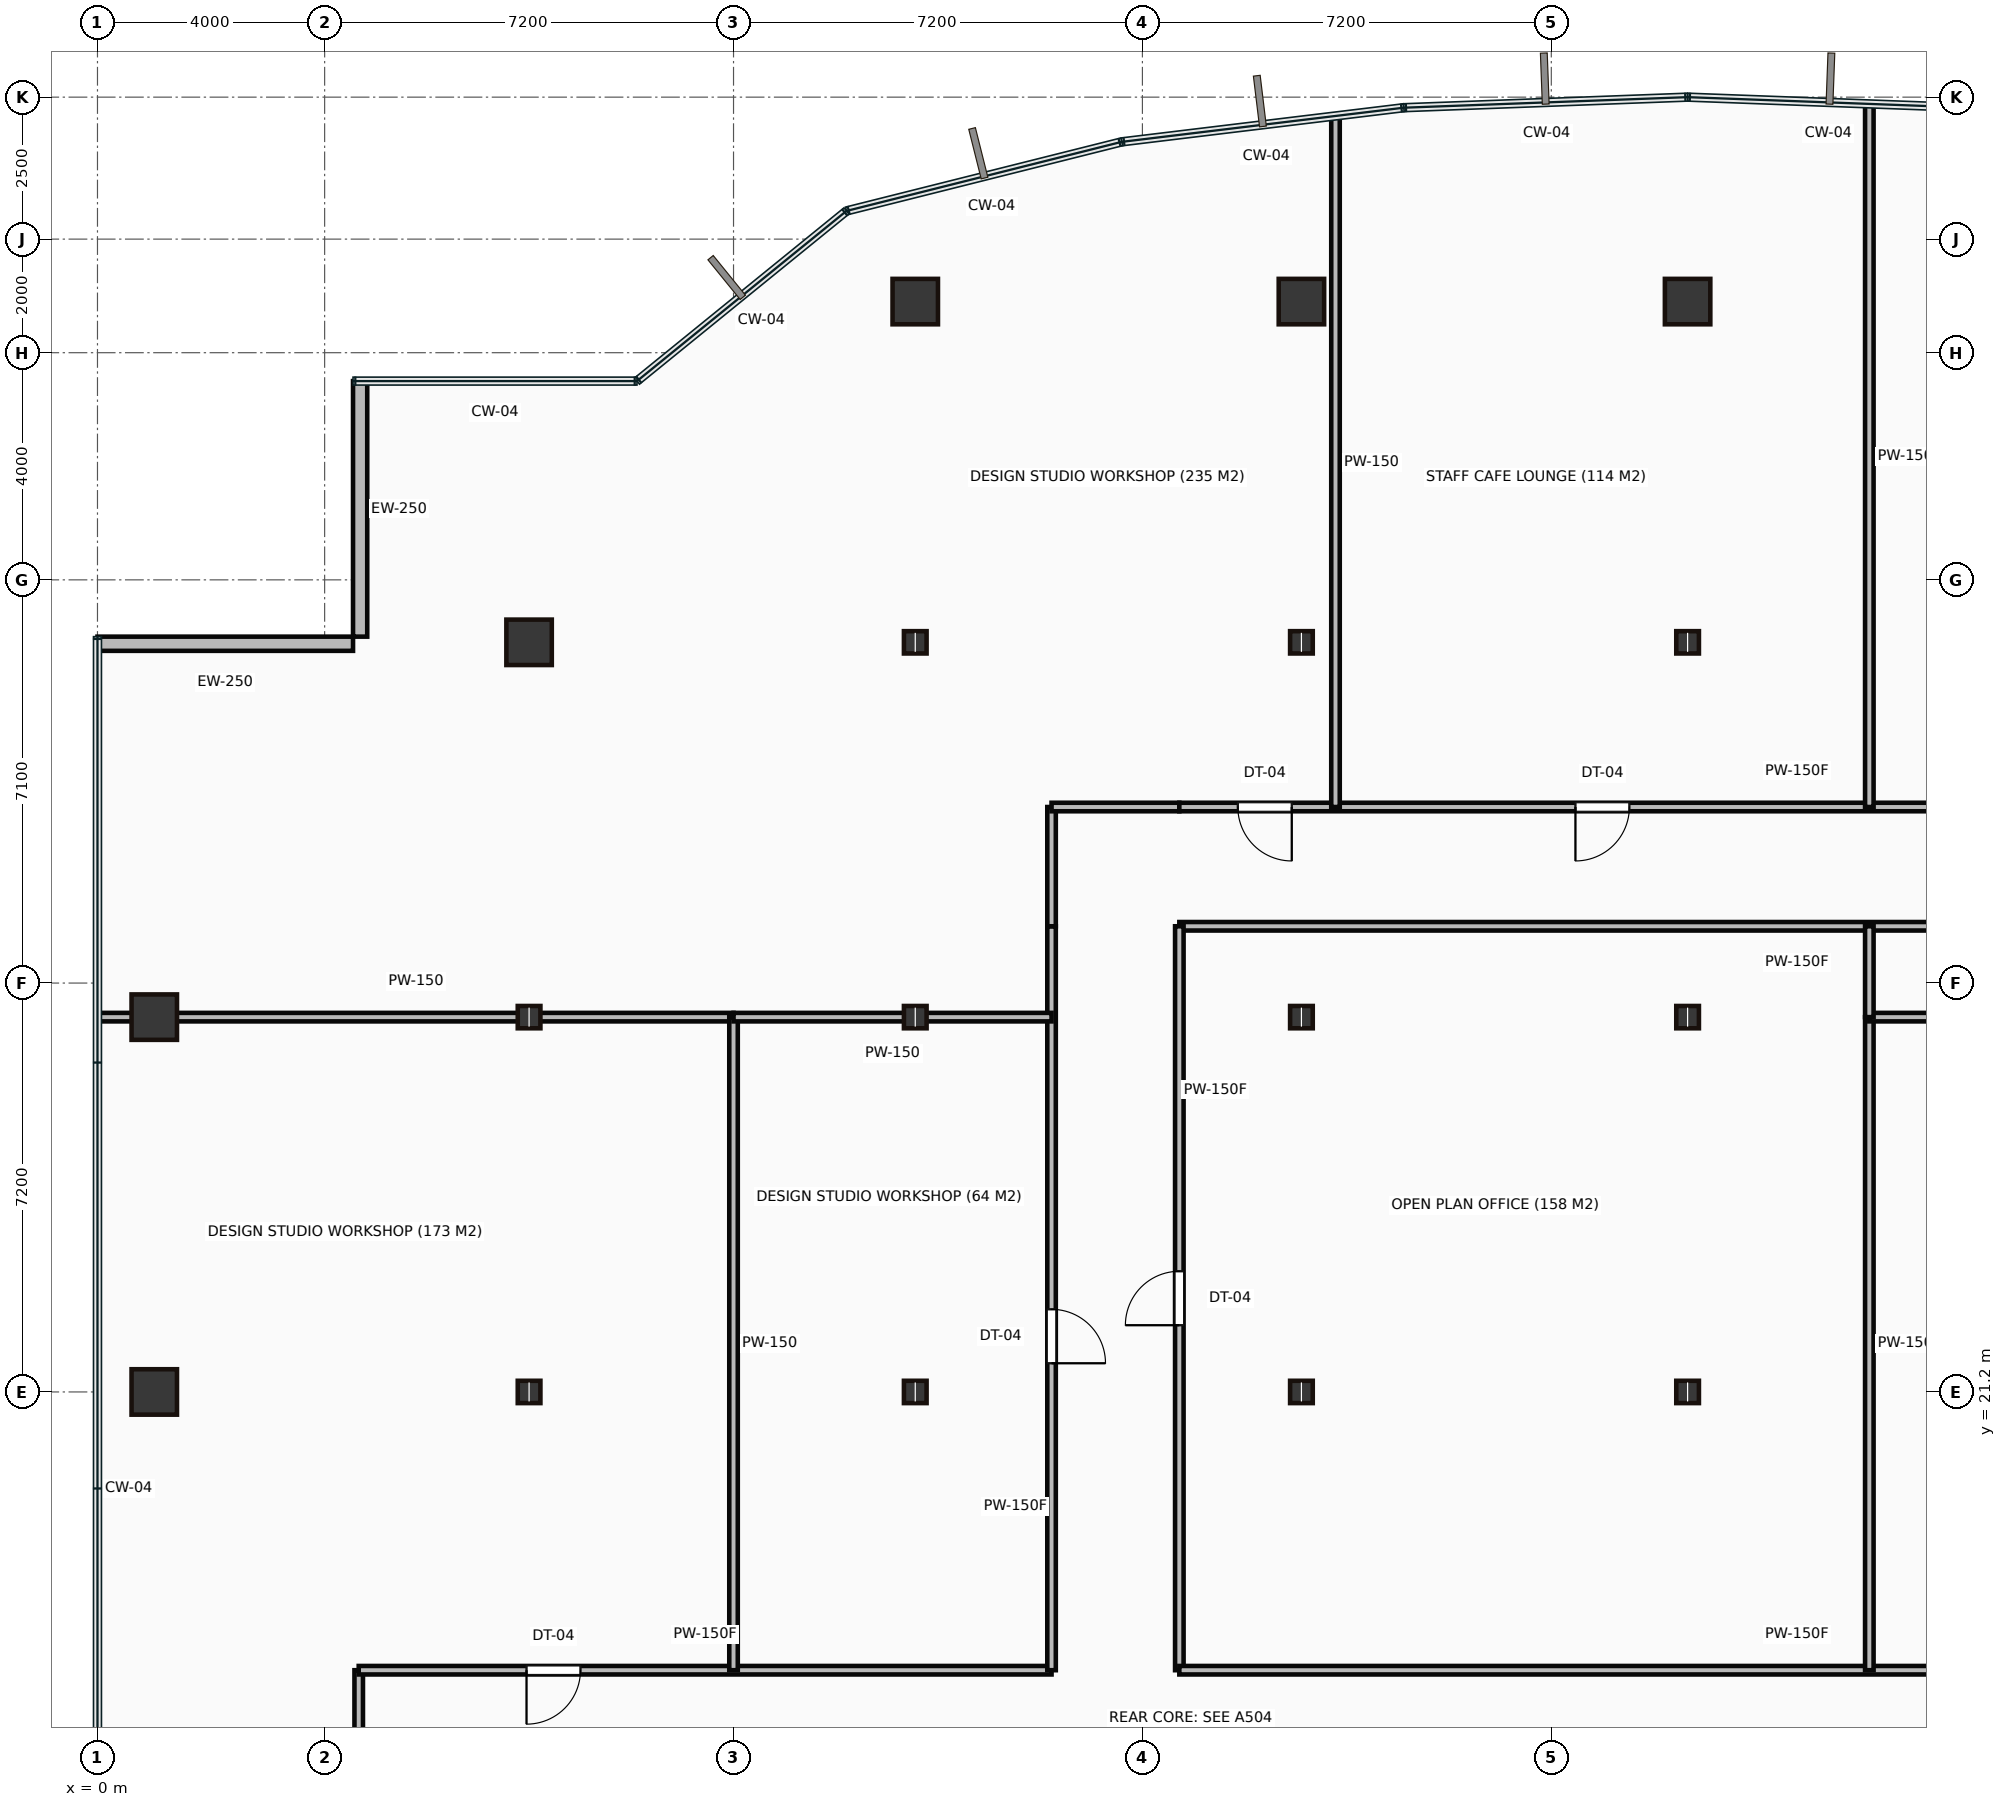
"""IFC4 building model, lengths in metres.
Left out: names, types, materials, properties, quantities, classifications, styles, units other than length and angle.
Written with IfcOpenShell. Run it as: python <this file> out.ifc"""

import sys

from ifc_helpers import new_model, si_unit, direction, frame, frame_2d, origin, origin_2d, place, context, subcontext, project, spatial, rectangle, hollow_rectangle, i_section, extrude, source, transform, mapped, element, fill, save


model = new_model("IFC4")
c1 = context("Model", 3, precision=1e-05, world=origin(), true_north=direction((0.0, 1.0)))
c2 = subcontext(c1, "Body", "Model", "MODEL_VIEW")
j1 = project(units=[si_unit("LENGTHUNIT", "METRE"), si_unit("PLANEANGLEUNIT", "RADIAN")], contexts=[c1])
p1 = place(None, origin())
s1 = spatial("IfcSite", under=j1, at=p1, CompositionType="ELEMENT")
p2 = place(p1, origin())
s2 = spatial("IfcBuilding", under=s1, at=p2, CompositionType="ELEMENT")
p3 = place(p2, frame((0.0, 0.0, 92.3)))
s3 = spatial("IfcBuildingStorey", under=s2, at=p3, CompositionType="ELEMENT", Elevation=92.3)
m1 = source(origin(), c2, "Body", "SweptSolid", [
    extrude(hollow_rectangle(XDim=0.8, YDim=0.8, WallThickness=0.04, at=origin_2d()), origin(), (0.0, 0.0, 1.0), 3.65),
])
for number, where, z_axis, x_axis in (
    (1, (1.0, 21.2, 0.0), (0.0, 0.0, 1.0), (1.0, 0.0, 0.0)),
    (2, (1.0, 27.8, 0.0), (0.0, 0.0, 1.0), (1.0, 0.0, 0.0)),
):
    element("IfcColumn", number, at=place(p3, frame(where, z_axis=z_axis, x_axis=x_axis)), inside=s3, PredefinedType="COLUMN", context=c2, shape_type="MappedRepresentation", body=[
        mapped(m1, transform((0.0, 0.0, 0.0))),
    ])
m2 = source(origin(), c2, "Body", "SweptSolid", [
    extrude(i_section(OverallWidth=0.399, OverallDepth=0.393, WebThickness=0.023, FlangeThickness=0.037, at=origin_2d()), origin(), (0.0, 0.0, 1.0), 3.65),
])
for number, where, z_axis, x_axis in (
    (3, (7.6, 21.2, 0.0), (0.0, 0.0, 1.0), (1.0, 0.0, 0.0)),
    (4, (7.6, 27.8, 0.0), (0.0, 0.0, 1.0), (1.0, 0.0, 0.0)),
):
    element("IfcColumn", number, at=place(p3, frame(where, z_axis=z_axis, x_axis=x_axis)), inside=s3, PredefinedType="COLUMN", context=c2, shape_type="MappedRepresentation", body=[
        mapped(m2, transform((0.0, 0.0, 0.0))),
    ])
p4 = place(p3, frame((7.6, 34.4, 0.0), z_axis=(0.0, 0.0, 1.0), x_axis=(1.0, 0.0, 0.0)))
e5 = element("IfcColumn", 5, at=p4, inside=s3, PredefinedType="COLUMN", context=c2, shape_type="MappedRepresentation", body=[
    mapped(m1, transform((0.0, 0.0, 0.0))),
])
for number, where, z_axis, x_axis in (
    (6, (14.4, 21.2, 0.0), (0.0, 0.0, 1.0), (1.0, 0.0, 0.0)),
    (7, (14.4, 27.8, 0.0), (0.0, 0.0, 1.0), (1.0, 0.0, 0.0)),
    (8, (14.4, 34.4, 0.0), (0.0, 0.0, 1.0), (1.0, 0.0, 0.0)),
):
    element("IfcColumn", number, at=place(p3, frame(where, z_axis=z_axis, x_axis=x_axis)), inside=s3, PredefinedType="COLUMN", context=c2, shape_type="MappedRepresentation", body=[
        mapped(m2, transform((0.0, 0.0, 0.0))),
    ])
p5 = place(p3, frame((14.4, 40.4, 0.0), z_axis=(0.0, 0.0, 1.0), x_axis=(1.0, 0.0, 0.0)))
e9 = element("IfcColumn", 9, at=p5, inside=s3, PredefinedType="COLUMN", context=c2, shape_type="MappedRepresentation", body=[
    mapped(m1, transform((0.0, 0.0, 0.0))),
])
for number, where, z_axis, x_axis in (
    (10, (21.2, 21.2, 0.0), (0.0, 0.0, 1.0), (1.0, 0.0, 0.0)),
    (11, (21.2, 27.8, 0.0), (0.0, 0.0, 1.0), (1.0, 0.0, 0.0)),
    (12, (21.2, 34.4, 0.0), (0.0, 0.0, 1.0), (1.0, 0.0, 0.0)),
):
    element("IfcColumn", number, at=place(p3, frame(where, z_axis=z_axis, x_axis=x_axis)), inside=s3, PredefinedType="COLUMN", context=c2, shape_type="MappedRepresentation", body=[
        mapped(m2, transform((0.0, 0.0, 0.0))),
    ])
p6 = place(p3, frame((21.2, 40.4, 0.0), z_axis=(0.0, 0.0, 1.0), x_axis=(1.0, 0.0, 0.0)))
e13 = element("IfcColumn", 13, at=p6, inside=s3, PredefinedType="COLUMN", context=c2, shape_type="MappedRepresentation", body=[
    mapped(m1, transform((0.0, 0.0, 0.0))),
])
for number, where, z_axis, x_axis in (
    (14, (28.0, 21.2, 0.0), (0.0, 0.0, 1.0), (1.0, 0.0, 0.0)),
    (15, (28.0, 27.8, 0.0), (0.0, 0.0, 1.0), (1.0, 0.0, 0.0)),
    (16, (28.0, 34.4, 0.0), (0.0, 0.0, 1.0), (1.0, 0.0, 0.0)),
):
    element("IfcColumn", number, at=place(p3, frame(where, z_axis=z_axis, x_axis=x_axis)), inside=s3, PredefinedType="COLUMN", context=c2, shape_type="MappedRepresentation", body=[
        mapped(m2, transform((0.0, 0.0, 0.0))),
    ])
p7 = place(p3, frame((28.0, 40.4, 0.0), z_axis=(0.0, 0.0, 1.0), x_axis=(1.0, 0.0, 0.0)))
e17 = element("IfcColumn", 17, at=p7, inside=s3, PredefinedType="COLUMN", context=c2, shape_type="MappedRepresentation", body=[
    mapped(m1, transform((0.0, 0.0, 0.0))),
])
m3 = source(origin(), c2, "Body", "SweptSolid", [
    extrude(rectangle(XDim=4.5, YDim=0.25, at=frame_2d((2.25, 0.0))), origin(), (0.0, 0.0, 1.0), 3.4),
])
for number, where, z_axis, x_axis in (
    (18, (4.625, 39.0, 0.0), (0.0, 0.0, 1.0), (0.0, -1.0, 0.0)),
    (19, (4.5, 34.375, 0.0), (0.0, 0.0, 1.0), (-1.0, 0.0, 0.0)),
):
    element("IfcWall", number, at=place(p3, frame(where, z_axis=z_axis, x_axis=x_axis)), inside=s3, PredefinedType="STANDARD", context=c2, shape_type="MappedRepresentation", body=[
        mapped(m3, transform((0.0, 0.0, 0.0))),
    ])
m4 = source(origin(), c2, "Body", "SweptSolid", [
    extrude(rectangle(XDim=2.22, YDim=0.15, at=frame_2d((1.11, 0.0))), origin(), (0.0, 0.0, 1.0), 3.4),
])
p8 = place(p3, frame((4.6, 14.08, 0.0), z_axis=(0.0, 0.0, 1.0), x_axis=(0.0, 1.0, 0.0)))
e20 = element("IfcWall", 20, at=p8, inside=s3, PredefinedType="PARTITIONING", context=c2, shape_type="MappedRepresentation", body=[
    mapped(m4, transform((0.0, 0.0, 0.0))),
])
m5 = source(origin(), c2, "Body", "SweptSolid", [
    extrude(rectangle(XDim=12.2, YDim=0.15, at=frame_2d((6.1, 0.0))), origin(), (0.0, 0.0, 1.0), 3.4),
])
p9 = place(p3, frame((4.6, 16.3, 0.0), z_axis=(0.0, 0.0, 1.0), x_axis=(1.0, 0.0, 0.0)))
e21 = element("IfcWall", 21, at=p9, inside=s3, PredefinedType="PARTITIONING", context=c2, shape_type="MappedRepresentation", body=[
    mapped(m5, transform((0.0, 0.0, 0.0))),
])
p10 = place(p9, frame((2.955, 0.0, 0.0)))
e22 = element("IfcOpeningElement", 22, at=p10, cuts=e21, PredefinedType="OPENING", context=c2, shape_type="SweptSolid", body=[
    extrude(rectangle(XDim=0.95, YDim=2.15, at=frame_2d((0.475, 1.075))), frame((0.0, 0.085, 0.0), z_axis=(0.0, -1.0, 0.0), x_axis=(1.0, 0.0, 0.0)), (0.0, 0.0, 1.0), 0.17),
])
m6 = source(origin(), c2, "Body", "SweptSolid", [
    extrude(rectangle(XDim=13.1, YDim=0.15, at=frame_2d((6.55, 0.0))), origin(), (0.0, 0.0, 1.0), 3.4),
])
p11 = place(p3, frame((16.8, 16.3, 0.0), z_axis=(0.0, 0.0, 1.0), x_axis=(0.0, 1.0, 0.0)))
e23 = element("IfcWall", 23, at=p11, inside=s3, PredefinedType="PARTITIONING", context=c2, shape_type="MappedRepresentation", body=[
    mapped(m6, transform((0.0, 0.0, 0.0))),
])
p12 = place(p11, frame((5.405, 0.0, 0.0)))
e24 = element("IfcOpeningElement", 24, at=p12, cuts=e23, PredefinedType="OPENING", context=c2, shape_type="SweptSolid", body=[
    extrude(rectangle(XDim=0.95, YDim=2.15, at=frame_2d((0.475, 1.075))), frame((0.0, 0.085, 0.0), z_axis=(0.0, -1.0, 0.0), x_axis=(1.0, 0.0, 0.0)), (0.0, 0.0, 1.0), 0.17),
])
m7 = source(origin(), c2, "Body", "SweptSolid", [
    extrude(rectangle(XDim=2.1, YDim=0.15, at=frame_2d((1.05, 0.0))), origin(), (0.0, 0.0, 1.0), 3.4),
])
p13 = place(p3, frame((16.8, 29.4, 0.0), z_axis=(0.0, 0.0, 1.0), x_axis=(0.0, 1.0, 0.0)))
e25 = element("IfcWall", 25, at=p13, inside=s3, PredefinedType="PARTITIONING", context=c2, shape_type="MappedRepresentation", body=[
    mapped(m7, transform((0.0, 0.0, 0.0))),
])
m8 = source(origin(), c2, "Body", "SweptSolid", [
    extrude(rectangle(XDim=2.25, YDim=0.15, at=frame_2d((1.125, 0.0))), origin(), (0.0, 0.0, 1.0), 3.4),
])
p14 = place(p3, frame((16.8, 31.5, 0.0), z_axis=(0.0, 0.0, 1.0), x_axis=(1.0, 0.0, 0.0)))
e26 = element("IfcWall", 26, at=p14, inside=s3, PredefinedType="PARTITIONING", context=c2, shape_type="MappedRepresentation", body=[
    mapped(m8, transform((0.0, 0.0, 0.0))),
])
m9 = source(origin(), c2, "Body", "SweptSolid", [
    extrude(rectangle(XDim=21.75, YDim=0.15, at=frame_2d((10.875, 0.0))), origin(), (0.0, 0.0, 1.0), 3.4),
])
p15 = place(p3, frame((19.05, 31.5, 0.0), z_axis=(0.0, 0.0, 1.0), x_axis=(1.0, 0.0, 0.0)))
e27 = element("IfcWall", 27, at=p15, inside=s3, PredefinedType="PARTITIONING", context=c2, shape_type="MappedRepresentation", body=[
    mapped(m9, transform((0.0, 0.0, 0.0))),
])
p16 = place(p15, frame((1.03, 0.0, 0.0)))
e28 = element("IfcOpeningElement", 28, at=p16, cuts=e27, PredefinedType="OPENING", context=c2, shape_type="SweptSolid", body=[
    extrude(rectangle(XDim=0.95, YDim=2.15, at=frame_2d((0.475, 1.075))), frame((0.0, 0.085, 0.0), z_axis=(0.0, -1.0, 0.0), x_axis=(1.0, 0.0, 0.0)), (0.0, 0.0, 1.0), 0.17),
])
p17 = place(p15, frame((6.975, 0.0, 0.0)))
e29 = element("IfcOpeningElement", 29, at=p17, cuts=e27, PredefinedType="OPENING", context=c2, shape_type="SweptSolid", body=[
    extrude(rectangle(XDim=0.95, YDim=2.15, at=frame_2d((0.475, 1.075))), frame((0.0, 0.085, 0.0), z_axis=(0.0, -1.0, 0.0), x_axis=(1.0, 0.0, 0.0)), (0.0, 0.0, 1.0), 0.17),
])
p18 = place(p15, frame((16.345, 0.0, 0.0)))
e30 = element("IfcOpeningElement", 30, at=p18, cuts=e27, PredefinedType="OPENING", context=c2, shape_type="SweptSolid", body=[
    extrude(rectangle(XDim=0.95, YDim=2.15, at=frame_2d((0.475, 1.075))), frame((0.0, 0.085, 0.0), z_axis=(0.0, -1.0, 0.0), x_axis=(1.0, 0.0, 0.0)), (0.0, 0.0, 1.0), 0.17),
])
p19 = place(p3, frame((40.8, 29.4, 0.0), z_axis=(0.0, 0.0, 1.0), x_axis=(-1.0, 0.0, 0.0)))
e31 = element("IfcWall", 31, at=p19, inside=s3, PredefinedType="PARTITIONING", context=c2, shape_type="MappedRepresentation", body=[
    mapped(m9, transform((0.0, 0.0, 0.0))),
])
p20 = place(p3, frame((19.05, 29.4, 0.0), z_axis=(0.0, 0.0, 1.0), x_axis=(0.0, -1.0, 0.0)))
e32 = element("IfcWall", 32, at=p20, inside=s3, PredefinedType="PARTITIONING", context=c2, shape_type="MappedRepresentation", body=[
    mapped(m6, transform((0.0, 0.0, 0.0))),
])
p21 = place(p20, frame((6.075, 0.0, 0.0)))
e33 = element("IfcOpeningElement", 33, at=p21, cuts=e32, PredefinedType="OPENING", context=c2, shape_type="SweptSolid", body=[
    extrude(rectangle(XDim=0.95, YDim=2.15, at=frame_2d((0.475, 1.075))), frame((0.0, 0.085, 0.0), z_axis=(0.0, -1.0, 0.0), x_axis=(1.0, 0.0, 0.0)), (0.0, 0.0, 1.0), 0.17),
])
p22 = place(p3, frame((19.05, 16.3, 0.0), z_axis=(0.0, 0.0, 1.0), x_axis=(1.0, 0.0, 0.0)))
e34 = element("IfcWall", 34, at=p22, inside=s3, PredefinedType="PARTITIONING", context=c2, shape_type="MappedRepresentation", body=[
    mapped(m9, transform((0.0, 0.0, 0.0))),
])
p23 = place(p22, frame((16.345, 0.0, 0.0)))
e35 = element("IfcOpeningElement", 35, at=p23, cuts=e34, PredefinedType="OPENING", context=c2, shape_type="SweptSolid", body=[
    extrude(rectangle(XDim=0.95, YDim=2.15, at=frame_2d((0.475, 1.075))), frame((0.0, 0.085, 0.0), z_axis=(0.0, -1.0, 0.0), x_axis=(1.0, 0.0, 0.0)), (0.0, 0.0, 1.0), 0.17),
])
m10 = source(origin(), c2, "Body", "SweptSolid", [
    extrude(rectangle(XDim=11.18, YDim=0.15, at=frame_2d((5.59, 0.0))), origin(), (0.0, 0.0, 1.0), 2.702),
])
p24 = place(p3, frame((0.02, 27.8, 0.0), z_axis=(0.0, 0.0, 1.0), x_axis=(1.0, 0.0, 0.0)))
e36 = element("IfcWall", 36, at=p24, inside=s3, PredefinedType="PARTITIONING", context=c2, shape_type="MappedRepresentation", body=[
    mapped(m10, transform((0.0, 0.0, 0.0))),
])
m11 = source(origin(), c2, "Body", "SweptSolid", [
    extrude(rectangle(XDim=11.5, YDim=0.15, at=frame_2d((5.75, 0.0))), origin(), (0.0, 0.0, 1.0), 3.4),
])
p25 = place(p3, frame((11.2, 27.8, 0.0), z_axis=(0.0, 0.0, 1.0), x_axis=(0.0, -1.0, 0.0)))
e37 = element("IfcWall", 37, at=p25, inside=s3, PredefinedType="PARTITIONING", context=c2, shape_type="MappedRepresentation", body=[
    mapped(m11, transform((0.0, 0.0, 0.0))),
])
m12 = source(origin(), c2, "Body", "SweptSolid", [
    extrude(rectangle(XDim=5.6, YDim=0.15, at=frame_2d((2.8, 0.0))), origin(), (0.0, 0.0, 1.0), 2.702),
])
p26 = place(p3, frame((16.8, 27.8, 0.0), z_axis=(0.0, 0.0, 1.0), x_axis=(-1.0, 0.0, 0.0)))
e38 = element("IfcWall", 38, at=p26, inside=s3, PredefinedType="PARTITIONING", context=c2, shape_type="MappedRepresentation", body=[
    mapped(m12, transform((0.0, 0.0, 0.0))),
])
m13 = source(origin(), c2, "Body", "SweptSolid", [
    extrude(rectangle(XDim=12.148, YDim=0.15, at=frame_2d((6.074, 0.0))), origin(), (0.0, 0.0, 1.0), 3.4),
])
p27 = place(p3, frame((21.8, 43.648, 0.0), z_axis=(0.0, 0.0, 1.0), x_axis=(0.0, -1.0, 0.0)))
e39 = element("IfcWall", 39, at=p27, inside=s3, PredefinedType="PARTITIONING", context=c2, shape_type="MappedRepresentation", body=[
    mapped(m13, transform((0.0, 0.0, 0.0))),
])
p28 = place(p3, frame((31.2, 27.8, 0.0), z_axis=(0.0, 0.0, 1.0), x_axis=(0.0, -1.0, 0.0)))
e40 = element("IfcWall", 40, at=p28, inside=s3, PredefinedType="PARTITIONING", context=c2, shape_type="MappedRepresentation", body=[
    mapped(m11, transform((0.0, 0.0, 0.0))),
])
m14 = source(origin(), c2, "Body", "SweptSolid", [
    extrude(rectangle(XDim=10.3, YDim=0.15, at=frame_2d((5.15, 0.0))), origin(), (0.0, 0.0, 1.0), 2.702),
])
p29 = place(p3, frame((41.5, 27.8, 0.0), z_axis=(0.0, 0.0, 1.0), x_axis=(-1.0, 0.0, 0.0)))
e41 = element("IfcWall", 41, at=p29, inside=s3, PredefinedType="PARTITIONING", context=c2, shape_type="MappedRepresentation", body=[
    mapped(m14, transform((0.0, 0.0, 0.0))),
])
m15 = source(origin(), c2, "Body", "SweptSolid", [
    extrude(rectangle(XDim=1.6, YDim=0.15, at=frame_2d((0.8, 0.0))), origin(), (0.0, 0.0, 1.0), 3.4),
])
p30 = place(p3, frame((31.2, 29.4, 0.0), z_axis=(0.0, 0.0, 1.0), x_axis=(0.0, -1.0, 0.0)))
e42 = element("IfcWall", 42, at=p30, inside=s3, PredefinedType="PARTITIONING", context=c2, shape_type="MappedRepresentation", body=[
    mapped(m15, transform((0.0, 0.0, 0.0))),
])
m16 = source(origin(), c2, "Body", "SweptSolid", [
    extrude(rectangle(XDim=12.361, YDim=0.15, at=frame_2d((6.18, 0.0))), origin(), (0.0, 0.0, 1.0), 3.4),
])
p31 = place(p3, frame((31.2, 43.861, 0.0), z_axis=(0.0, 0.0, 1.0), x_axis=(0.0, -1.0, 0.0)))
e43 = element("IfcWall", 43, at=p31, inside=s3, PredefinedType="PARTITIONING", context=c2, shape_type="MappedRepresentation", body=[
    mapped(m16, transform((0.0, 0.0, 0.0))),
])
m17 = source(origin(), c2, "Body", "SweptSolid", [
    extrude(rectangle(XDim=0.95, YDim=2.15, at=frame_2d((0.475, 1.075))), frame((0.0, 0.025, 0.0), z_axis=(0.0, -1.0, 0.0), x_axis=(1.0, 0.0, 0.0)), (0.0, 0.0, 1.0), 0.05),
])
p32 = place(p10, origin())
e44 = element("IfcDoor", 44, at=p32, inside=s3, OperationType="SINGLE_SWING_LEFT", PredefinedType="DOOR", context=c2, shape_type="MappedRepresentation", body=[
    mapped(m17, transform((0.0, 0.0, 0.0))),
])
fill(e22, e44)
p33 = place(p16, origin())
e45 = element("IfcDoor", 45, at=p33, inside=s3, OperationType="SINGLE_SWING_RIGHT", PredefinedType="DOOR", context=c2, shape_type="MappedRepresentation", body=[
    mapped(m17, transform((0.0, 0.0, 0.0))),
])
fill(e28, e45)
p34 = place(p12, origin())
e46 = element("IfcDoor", 46, at=p34, inside=s3, OperationType="SINGLE_SWING_LEFT", PredefinedType="DOOR", context=c2, shape_type="MappedRepresentation", body=[
    mapped(m17, transform((0.0, 0.0, 0.0))),
])
fill(e24, e46)
p35 = place(p21, origin())
e47 = element("IfcDoor", 47, at=p35, inside=s3, OperationType="SINGLE_SWING_RIGHT", PredefinedType="DOOR", context=c2, shape_type="MappedRepresentation", body=[
    mapped(m17, transform((0.0, 0.0, 0.0))),
])
fill(e33, e47)
p36 = place(p17, origin())
e48 = element("IfcDoor", 48, at=p36, inside=s3, OperationType="SINGLE_SWING_LEFT", PredefinedType="DOOR", context=c2, shape_type="MappedRepresentation", body=[
    mapped(m17, transform((0.0, 0.0, 0.0))),
])
fill(e29, e48)
save(model, sys.argv[1])
